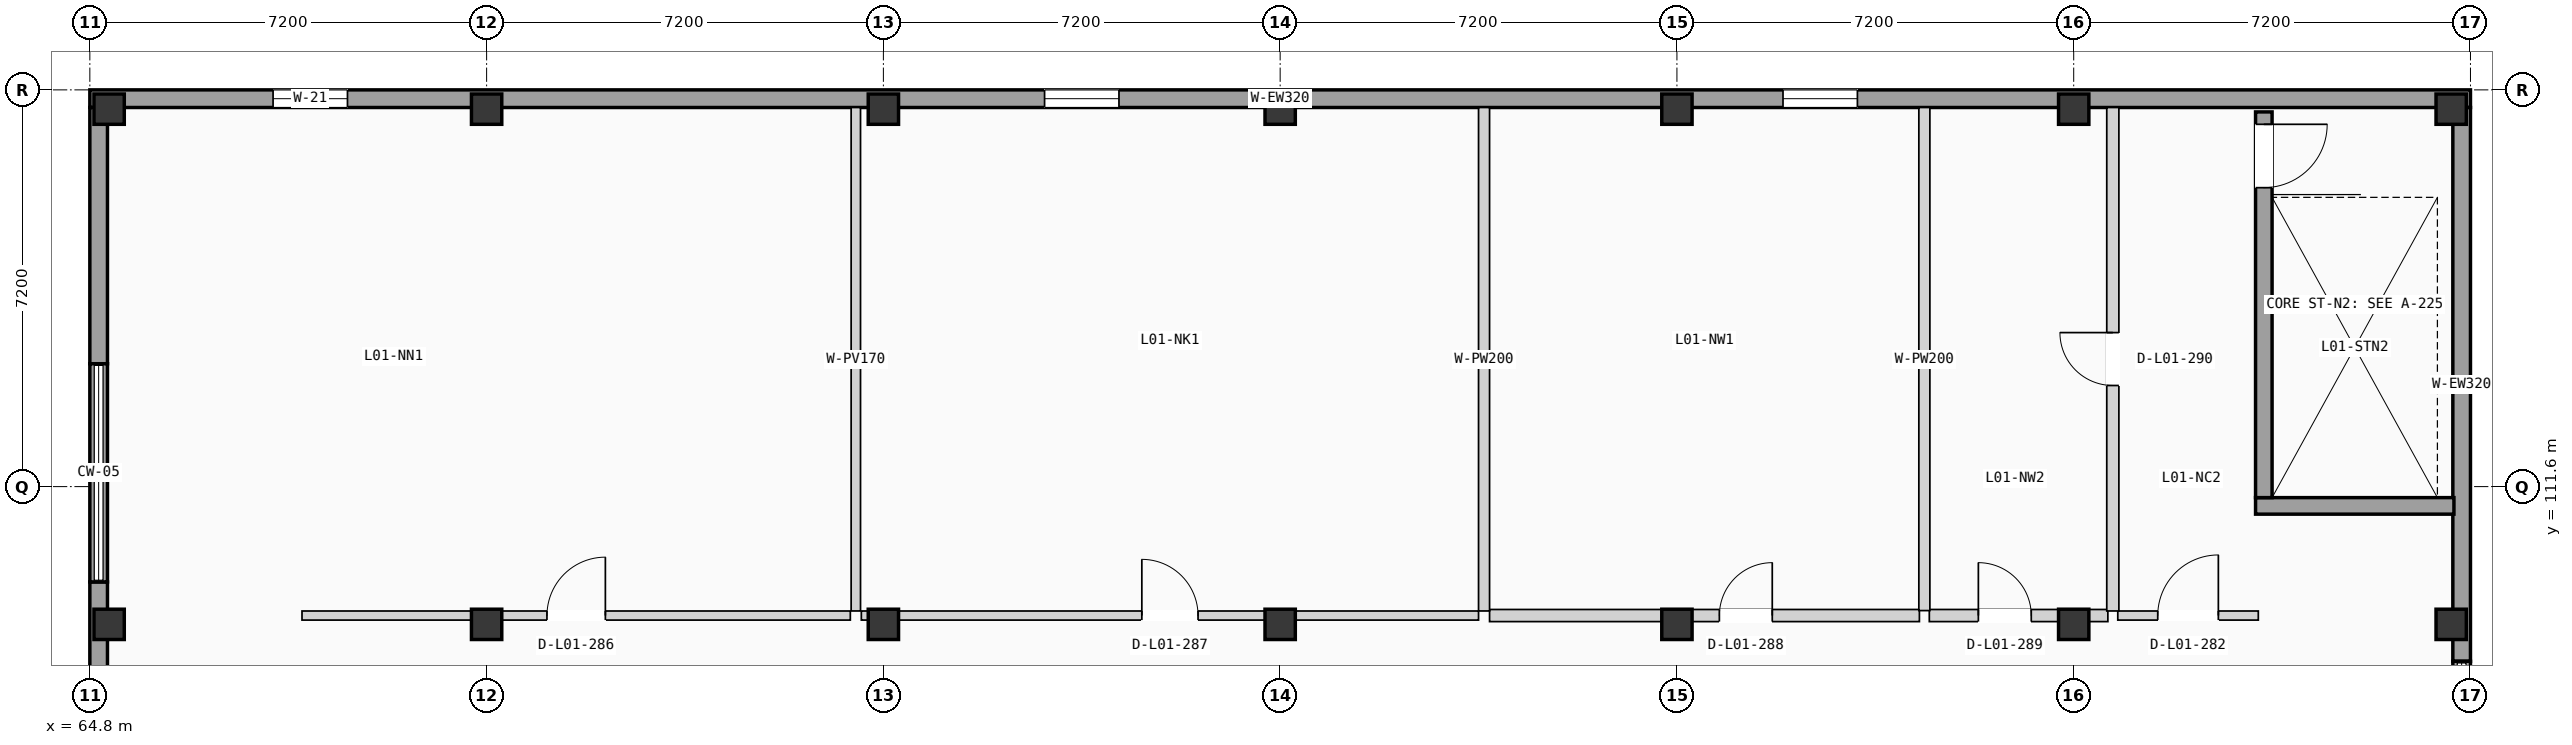
"""IFC4 building model, lengths in metres.
Left out: names, types, materials, properties, quantities, classifications, styles, units other than length and angle.
Written with IfcOpenShell. Run it as: python <this file> out.ifc"""

import sys

from ifc_helpers import new_model, si_unit, direction, frame, frame_2d, origin, origin_2d, place, context, subcontext, project, spatial, rectangle, extrude, element, fill, save


model = new_model("IFC4")
c1 = context("Model", 3, precision=1e-05, world=origin(), true_north=direction((0.0, 1.0)))
c2 = subcontext(c1, "Body", "Model", "MODEL_VIEW")
j1 = project(units=[si_unit("LENGTHUNIT", "METRE"), si_unit("PLANEANGLEUNIT", "RADIAN")], contexts=[c1])
p1 = place(None, origin())
s1 = spatial("IfcSite", under=j1, at=p1, CompositionType="ELEMENT")
p2 = place(p1, origin())
s2 = spatial("IfcBuilding", under=s1, at=p2, CompositionType="ELEMENT")
p3 = place(p2, frame((0.0, 0.0, 4.9)))
s3 = spatial("IfcBuildingStorey", under=s2, at=p3, CompositionType="ELEMENT", Elevation=4.9)
for number, where, z_axis, x_axis in (
    (1, (65.15, 109.1, 0.0), (0.0, 0.0, 1.0), (1.0, 0.0, 0.0)),
    (2, (65.15, 118.45, 0.0), (0.0, 0.0, 1.0), (1.0, 0.0, 0.0)),
    (3, (72.0, 109.1, 0.0), (0.0, 0.0, 1.0), (1.0, 0.0, 0.0)),
    (4, (72.0, 118.45, 0.0), (0.0, 0.0, 1.0), (1.0, 0.0, 0.0)),
    (5, (79.2, 109.1, 0.0), (0.0, 0.0, 1.0), (1.0, 0.0, 0.0)),
    (6, (79.2, 118.45, 0.0), (0.0, 0.0, 1.0), (1.0, 0.0, 0.0)),
    (7, (86.4, 109.1, 0.0), (0.0, 0.0, 1.0), (1.0, 0.0, 0.0)),
    (8, (86.4, 118.45, 0.0), (0.0, 0.0, 1.0), (1.0, 0.0, 0.0)),
    (9, (93.6, 109.1, 0.0), (0.0, 0.0, 1.0), (1.0, 0.0, 0.0)),
    (10, (93.6, 118.45, 0.0), (0.0, 0.0, 1.0), (1.0, 0.0, 0.0)),
    (11, (100.8, 109.1, 0.0), (0.0, 0.0, 1.0), (1.0, 0.0, 0.0)),
    (12, (100.8, 118.45, 0.0), (0.0, 0.0, 1.0), (1.0, 0.0, 0.0)),
    (13, (107.65, 109.1, 0.0), (0.0, 0.0, 1.0), (1.0, 0.0, 0.0)),
    (14, (107.65, 118.45, 0.0), (0.0, 0.0, 1.0), (1.0, 0.0, 0.0)),
):
    element("IfcColumn", number, at=place(p3, frame(where, z_axis=z_axis, x_axis=x_axis)), inside=s3, PredefinedType="COLUMN", context=c2, shape_type="SweptSolid", body=[
        extrude(rectangle(XDim=0.55, YDim=0.55, at=origin_2d()), origin(), (0.0, 0.0, 1.0), 3.675),
    ])
p4 = place(p3, frame((64.8, 118.64, 0.0), z_axis=(0.0, 0.0, 1.0), x_axis=(1.0, 0.0, 0.0)))
e15 = element("IfcWall", 15, at=p4, inside=s3, PredefinedType="SOLIDWALL", context=c2, shape_type="SweptSolid", body=[
    extrude(rectangle(XDim=43.2, YDim=0.32, at=frame_2d((21.6, 0.0))), origin(), (0.0, 0.0, 1.0), 3.675),
])
p5 = place(p4, frame((3.325, 0.0, 0.8)))
e16 = element("IfcOpeningElement", 16, at=p5, cuts=e15, PredefinedType="OPENING", context=c2, shape_type="SweptSolid", body=[
    extrude(rectangle(XDim=1.35, YDim=1.2, at=frame_2d((0.675, 0.6))), frame((0.0, 0.17, 0.0), z_axis=(0.0, -1.0, 0.0), x_axis=(1.0, 0.0, 0.0)), (0.0, 0.0, 1.0), 0.34),
])
p6 = place(p4, frame((17.325, 0.0, 0.8)))
e17 = element("IfcOpeningElement", 17, at=p6, cuts=e15, PredefinedType="OPENING", context=c2, shape_type="SweptSolid", body=[
    extrude(rectangle(XDim=1.35, YDim=1.2, at=frame_2d((0.675, 0.6))), frame((0.0, 0.17, 0.0), z_axis=(0.0, -1.0, 0.0), x_axis=(1.0, 0.0, 0.0)), (0.0, 0.0, 1.0), 0.34),
])
p7 = place(p4, frame((30.725, 0.0, 0.8)))
e18 = element("IfcOpeningElement", 18, at=p7, cuts=e15, PredefinedType="OPENING", context=c2, shape_type="SweptSolid", body=[
    extrude(rectangle(XDim=1.35, YDim=1.2, at=frame_2d((0.675, 0.6))), frame((0.0, 0.17, 0.0), z_axis=(0.0, -1.0, 0.0), x_axis=(1.0, 0.0, 0.0)), (0.0, 0.0, 1.0), 0.34),
])
p8 = place(p3, frame((64.96, 108.33, 0.0), z_axis=(0.0, 0.0, 1.0), x_axis=(0.0, 1.0, 0.0)))
e19 = element("IfcWall", 19, at=p8, inside=s3, PredefinedType="SOLIDWALL", context=c2, shape_type="SweptSolid", body=[
    extrude(rectangle(XDim=1.54, YDim=0.32, at=frame_2d((0.77, 0.0))), origin(), (0.0, 0.0, 1.0), 3.675),
])
p9 = place(p3, frame((64.96, 113.83, 0.0), z_axis=(0.0, 0.0, 1.0), x_axis=(0.0, 1.0, 0.0)))
e20 = element("IfcWall", 20, at=p9, inside=s3, PredefinedType="SOLIDWALL", context=c2, shape_type="SweptSolid", body=[
    extrude(rectangle(XDim=4.65, YDim=0.32, at=frame_2d((2.325, 0.0))), origin(), (0.0, 0.0, 1.0), 3.675),
])
p10 = place(p3, frame((64.96, 109.87, 0.0), z_axis=(0.0, 0.0, 1.0), x_axis=(0.0, 1.0, 0.0)))
e21 = element("IfcWall", 21, at=p10, inside=s3, PredefinedType="SOLIDWALL", context=c2, shape_type="SweptSolid", body=[
    extrude(rectangle(XDim=3.96, YDim=0.32, at=frame_2d((1.98, 0.0))), origin(), (0.0, 0.0, 1.0), 1.11),
])
p11 = place(p3, frame((107.84, 108.43, 0.0), z_axis=(0.0, 0.0, 1.0), x_axis=(0.0, 1.0, 0.0)))
e22 = element("IfcWall", 22, at=p11, inside=s3, PredefinedType="SOLIDWALL", context=c2, shape_type="SweptSolid", body=[
    extrude(rectangle(XDim=10.05, YDim=0.32, at=frame_2d((5.025, 0.0))), origin(), (0.0, 0.0, 1.0), 3.675),
])
p12 = place(p3, frame((107.84, 104.57, 0.0), z_axis=(0.0, 0.0, 1.0), x_axis=(0.0, 1.0, 0.0)))
e23 = element("IfcWall", 23, at=p12, inside=s3, PredefinedType="SOLIDWALL", context=c2, shape_type="SweptSolid", body=[
    extrude(rectangle(XDim=3.86, YDim=0.32, at=frame_2d((1.93, 0.0))), origin(), (0.0, 0.0, 1.0), 1.11),
])
p13 = place(p3, frame((104.1, 111.25, 0.0), z_axis=(0.0, 0.0, 1.0), x_axis=(1.0, 0.0, 0.0)))
e24 = element("IfcWall", 24, at=p13, inside=s3, PredefinedType="SHEAR", context=c2, shape_type="SweptSolid", body=[
    extrude(rectangle(XDim=3.6, YDim=0.3, at=frame_2d((1.8, 0.0))), origin(), (0.0, 0.0, 1.0), 3.405),
])
p14 = place(p3, frame((104.25, 111.4, 0.0), z_axis=(0.0, 0.0, 1.0), x_axis=(0.0, 1.0, 0.0)))
e25 = element("IfcWall", 25, at=p14, inside=s3, PredefinedType="SHEAR", context=c2, shape_type="SweptSolid", body=[
    extrude(rectangle(XDim=7.0, YDim=0.3, at=frame_2d((3.5, 0.0))), origin(), (0.0, 0.0, 1.0), 3.405),
])
p15 = place(p14, frame((5.625, 0.0, 0.0)))
e26 = element("IfcOpeningElement", 26, at=p15, cuts=e25, PredefinedType="OPENING", context=c2, shape_type="SweptSolid", body=[
    extrude(rectangle(XDim=1.15, YDim=2.12, at=frame_2d((0.575, 1.06))), frame((0.0, 0.16, 0.0), z_axis=(0.0, -1.0, 0.0), x_axis=(1.0, 0.0, 0.0)), (0.0, 0.0, 1.0), 0.32),
])
p16 = place(p3, frame((101.6, 109.26, 0.0), z_axis=(0.0, 0.0, 1.0), x_axis=(1.0, 0.0, 0.0)))
e27 = element("IfcWall", 27, at=p16, inside=s3, PredefinedType="PARTITIONING", context=c2, shape_type="SweptSolid", body=[
    extrude(rectangle(XDim=2.55, YDim=0.165, at=frame_2d((1.275, 0.0))), origin(), (0.0, 0.0, 1.0), 2.725),
])
p17 = place(p16, frame((0.725, 0.0, 0.0)))
e28 = element("IfcOpeningElement", 28, at=p17, cuts=e27, PredefinedType="OPENING", context=c2, shape_type="SweptSolid", body=[
    extrude(rectangle(XDim=1.1, YDim=2.12, at=frame_2d((0.55, 1.06))), frame((0.0, 0.093, 0.0), z_axis=(0.0, -1.0, 0.0), x_axis=(1.0, 0.0, 0.0)), (0.0, 0.0, 1.0), 0.185),
])
p18 = place(p3, frame((68.65, 109.26, 0.0), z_axis=(0.0, 0.0, 1.0), x_axis=(1.0, 0.0, 0.0)))
e29 = element("IfcWall", 29, at=p18, inside=s3, PredefinedType="PARTITIONING", context=c2, shape_type="SweptSolid", body=[
    extrude(rectangle(XDim=9.95, YDim=0.165, at=frame_2d((4.975, 0.0))), origin(), (0.0, 0.0, 1.0), 2.725),
])
p19 = place(p18, frame((4.445, 0.0, 0.0)))
e30 = element("IfcOpeningElement", 30, at=p19, cuts=e29, PredefinedType="OPENING", context=c2, shape_type="SweptSolid", body=[
    extrude(rectangle(XDim=1.06, YDim=2.14, at=frame_2d((0.53, 1.07))), frame((0.0, 0.093, 0.0), z_axis=(0.0, -1.0, 0.0), x_axis=(1.0, 0.0, 0.0)), (0.0, 0.0, 1.0), 0.185),
])
p20 = place(p3, frame((78.8, 109.26, 0.0), z_axis=(0.0, 0.0, 1.0), x_axis=(1.0, 0.0, 0.0)))
e31 = element("IfcWall", 31, at=p20, inside=s3, PredefinedType="PARTITIONING", context=c2, shape_type="SweptSolid", body=[
    extrude(rectangle(XDim=11.2, YDim=0.165, at=frame_2d((5.6, 0.0))), origin(), (0.0, 0.0, 1.0), 2.725),
])
p21 = place(p20, frame((5.09, 0.0, 0.0)))
e32 = element("IfcOpeningElement", 32, at=p21, cuts=e31, PredefinedType="OPENING", context=c2, shape_type="SweptSolid", body=[
    extrude(rectangle(XDim=1.02, YDim=2.16, at=frame_2d((0.51, 1.08))), frame((0.0, 0.093, 0.0), z_axis=(0.0, -1.0, 0.0), x_axis=(1.0, 0.0, 0.0)), (0.0, 0.0, 1.0), 0.185),
])
p22 = place(p3, frame((90.2, 109.26, 0.0), z_axis=(0.0, 0.0, 1.0), x_axis=(1.0, 0.0, 0.0)))
e33 = element("IfcWall", 33, at=p22, inside=s3, PredefinedType="PLUMBINGWALL", context=c2, shape_type="SweptSolid", body=[
    extrude(rectangle(XDim=7.8, YDim=0.22, at=frame_2d((3.9, 0.0))), origin(), (0.0, 0.0, 1.0), 2.725),
])
p23 = place(p22, frame((4.17, 0.0, 0.0)))
e34 = element("IfcOpeningElement", 34, at=p23, cuts=e33, PredefinedType="OPENING", context=c2, shape_type="SweptSolid", body=[
    extrude(rectangle(XDim=0.96, YDim=2.05, at=frame_2d((0.48, 1.025))), frame((0.0, 0.12, 0.0), z_axis=(0.0, -1.0, 0.0), x_axis=(1.0, 0.0, 0.0)), (0.0, 0.0, 1.0), 0.24),
])
p24 = place(p3, frame((98.18, 109.26, 0.0), z_axis=(0.0, 0.0, 1.0), x_axis=(1.0, 0.0, 0.0)))
e35 = element("IfcWall", 35, at=p24, inside=s3, PredefinedType="PLUMBINGWALL", context=c2, shape_type="SweptSolid", body=[
    extrude(rectangle(XDim=3.24, YDim=0.22, at=frame_2d((1.62, 0.0))), origin(), (0.0, 0.0, 1.0), 2.725),
])
p25 = place(p24, frame((0.89, 0.0, 0.0)))
e36 = element("IfcOpeningElement", 36, at=p25, cuts=e35, PredefinedType="OPENING", context=c2, shape_type="SweptSolid", body=[
    extrude(rectangle(XDim=0.96, YDim=2.05, at=frame_2d((0.48, 1.025))), frame((0.0, 0.12, 0.0), z_axis=(0.0, -1.0, 0.0), x_axis=(1.0, 0.0, 0.0)), (0.0, 0.0, 1.0), 0.24),
])
p26 = place(p3, frame((101.51, 109.343, 0.0), z_axis=(0.0, 0.0, 1.0), x_axis=(0.0, 1.0, 0.0)))
e37 = element("IfcWall", 37, at=p26, inside=s3, PredefinedType="PLUMBINGWALL", context=c2, shape_type="SweptSolid", body=[
    extrude(rectangle(XDim=9.137, YDim=0.22, at=frame_2d((4.568, 0.0))), origin(), (0.0, 0.0, 1.0), 2.84),
])
p27 = place(p26, frame((4.092, 0.0, 0.0)))
e38 = element("IfcOpeningElement", 38, at=p27, cuts=e37, PredefinedType="OPENING", context=c2, shape_type="SweptSolid", body=[
    extrude(rectangle(XDim=0.96, YDim=2.05, at=frame_2d((0.48, 1.025))), frame((0.0, 0.12, 0.0), z_axis=(0.0, -1.0, 0.0), x_axis=(1.0, 0.0, 0.0)), (0.0, 0.0, 1.0), 0.24),
])
p28 = place(p3, frame((78.7, 109.343, 0.0), z_axis=(0.0, 0.0, 1.0), x_axis=(0.0, 1.0, 0.0)))
e39 = element("IfcWall", 39, at=p28, inside=s3, PredefinedType="PARTITIONING", context=c2, shape_type="SweptSolid", body=[
    extrude(rectangle(XDim=9.137, YDim=0.17, at=frame_2d((4.568, 0.0))), origin(), (0.0, 0.0, 1.0), 2.84),
])
p29 = place(p3, frame((90.1, 109.343, 0.0), z_axis=(0.0, 0.0, 1.0), x_axis=(0.0, 1.0, 0.0)))
e40 = element("IfcWall", 40, at=p29, inside=s3, PredefinedType="PLUMBINGWALL", context=c2, shape_type="SweptSolid", body=[
    extrude(rectangle(XDim=9.137, YDim=0.2, at=frame_2d((4.568, 0.0))), origin(), (0.0, 0.0, 1.0), 2.84),
])
p30 = place(p3, frame((98.09, 109.35, 0.0), z_axis=(0.0, 0.0, 1.0), x_axis=(0.0, 1.0, 0.0)))
e41 = element("IfcWall", 41, at=p30, inside=s3, PredefinedType="PLUMBINGWALL", context=c2, shape_type="SweptSolid", body=[
    extrude(rectangle(XDim=9.13, YDim=0.2, at=frame_2d((4.565, 0.0))), origin(), (0.0, 0.0, 1.0), 2.84),
])
p31 = place(p5, origin())
e42 = element("IfcWindow", 42, at=p31, inside=s3, PartitioningType="SINGLE_PANEL", PredefinedType="WINDOW", context=c2, shape_type="SweptSolid", body=[
    extrude(rectangle(XDim=1.35, YDim=1.2, at=frame_2d((0.675, 0.6))), frame((0.0, 0.03, 0.0), z_axis=(0.0, -1.0, 0.0), x_axis=(1.0, 0.0, 0.0)), (0.0, 0.0, 1.0), 0.06),
])
fill(e16, e42)
p32 = place(p6, origin())
e43 = element("IfcWindow", 43, at=p32, inside=s3, PartitioningType="SINGLE_PANEL", PredefinedType="WINDOW", context=c2, shape_type="SweptSolid", body=[
    extrude(rectangle(XDim=1.35, YDim=1.2, at=frame_2d((0.675, 0.6))), frame((0.0, 0.03, 0.0), z_axis=(0.0, -1.0, 0.0), x_axis=(1.0, 0.0, 0.0)), (0.0, 0.0, 1.0), 0.06),
])
fill(e17, e43)
p33 = place(p7, origin())
e44 = element("IfcWindow", 44, at=p33, inside=s3, PartitioningType="SINGLE_PANEL", PredefinedType="WINDOW", context=c2, shape_type="SweptSolid", body=[
    extrude(rectangle(XDim=1.35, YDim=1.2, at=frame_2d((0.675, 0.6))), frame((0.0, 0.03, 0.0), z_axis=(0.0, -1.0, 0.0), x_axis=(1.0, 0.0, 0.0)), (0.0, 0.0, 1.0), 0.06),
])
fill(e18, e44)
p34 = place(p15, frame((1.15, 0.0, 0.0), z_axis=(0.0, 0.0, 1.0), x_axis=(-1.0, 0.0, 0.0)))
e45 = element("IfcDoor", 45, at=p34, inside=s3, OperationType="SINGLE_SWING_RIGHT", PredefinedType="DOOR", context=c2, shape_type="SweptSolid", body=[
    extrude(rectangle(XDim=1.15, YDim=2.12, at=frame_2d((0.575, 1.06))), frame((0.0, 0.025, 0.0), z_axis=(0.0, -1.0, 0.0), x_axis=(1.0, 0.0, 0.0)), (0.0, 0.0, 1.0), 0.05),
])
fill(e26, e45)
p35 = place(p17, origin())
e46 = element("IfcDoor", 46, at=p35, inside=s3, OperationType="SINGLE_SWING_RIGHT", PredefinedType="DOOR", context=c2, shape_type="SweptSolid", body=[
    extrude(rectangle(XDim=1.1, YDim=2.12, at=frame_2d((0.55, 1.06))), frame((0.0, 0.025, 0.0), z_axis=(0.0, -1.0, 0.0), x_axis=(1.0, 0.0, 0.0)), (0.0, 0.0, 1.0), 0.05),
])
fill(e28, e46)
p36 = place(p19, origin())
e47 = element("IfcDoor", 47, at=p36, inside=s3, OperationType="SINGLE_SWING_RIGHT", PredefinedType="DOOR", context=c2, shape_type="SweptSolid", body=[
    extrude(rectangle(XDim=1.06, YDim=2.14, at=frame_2d((0.53, 1.07))), frame((0.0, 0.025, 0.0), z_axis=(0.0, -1.0, 0.0), x_axis=(1.0, 0.0, 0.0)), (0.0, 0.0, 1.0), 0.05),
])
fill(e30, e47)
p37 = place(p21, origin())
e48 = element("IfcDoor", 48, at=p37, inside=s3, OperationType="SINGLE_SWING_LEFT", PredefinedType="DOOR", context=c2, shape_type="SweptSolid", body=[
    extrude(rectangle(XDim=1.02, YDim=2.16, at=frame_2d((0.51, 1.08))), frame((0.0, 0.025, 0.0), z_axis=(0.0, -1.0, 0.0), x_axis=(1.0, 0.0, 0.0)), (0.0, 0.0, 1.0), 0.05),
])
fill(e32, e48)
p38 = place(p23, origin())
e49 = element("IfcDoor", 49, at=p38, inside=s3, OperationType="SINGLE_SWING_RIGHT", PredefinedType="DOOR", context=c2, shape_type="SweptSolid", body=[
    extrude(rectangle(XDim=0.96, YDim=2.05, at=frame_2d((0.48, 1.025))), frame((0.0, 0.025, 0.0), z_axis=(0.0, -1.0, 0.0), x_axis=(1.0, 0.0, 0.0)), (0.0, 0.0, 1.0), 0.05),
])
fill(e34, e49)
p39 = place(p25, origin())
e50 = element("IfcDoor", 50, at=p39, inside=s3, OperationType="SINGLE_SWING_LEFT", PredefinedType="DOOR", context=c2, shape_type="SweptSolid", body=[
    extrude(rectangle(XDim=0.96, YDim=2.05, at=frame_2d((0.48, 1.025))), frame((0.0, 0.025, 0.0), z_axis=(0.0, -1.0, 0.0), x_axis=(1.0, 0.0, 0.0)), (0.0, 0.0, 1.0), 0.05),
])
fill(e36, e50)
p40 = place(p27, origin())
e51 = element("IfcDoor", 51, at=p40, inside=s3, OperationType="SINGLE_SWING_RIGHT", PredefinedType="DOOR", context=c2, shape_type="SweptSolid", body=[
    extrude(rectangle(XDim=0.96, YDim=2.05, at=frame_2d((0.48, 1.025))), frame((0.0, 0.025, 0.0), z_axis=(0.0, -1.0, 0.0), x_axis=(1.0, 0.0, 0.0)), (0.0, 0.0, 1.0), 0.05),
])
fill(e38, e51)
save(model, sys.argv[1])
